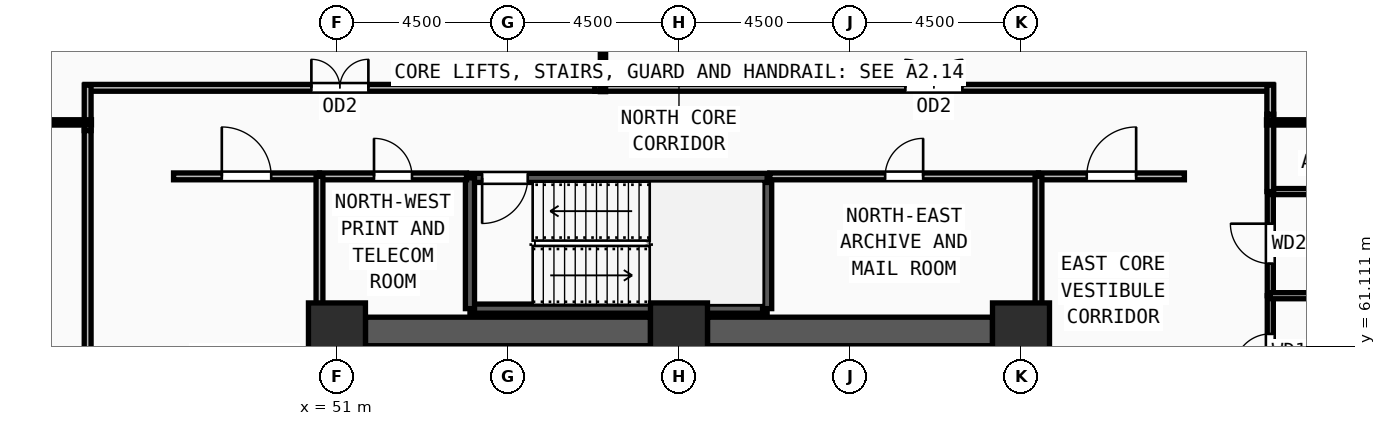
"""IFC4 building model, lengths in metres.
Left out: names, types, materials, properties, quantities, classifications, styles, units other than length and angle.
Written with IfcOpenShell. Run it as: python <this file> out.ifc"""

import sys

from ifc_helpers import new_model, si_unit, direction, frame, frame_2d, origin, origin_2d, place, context, subcontext, project, spatial, rectangle, extrude, source, transform, mapped, element, fill, save


model = new_model("IFC4")
c1 = context("Model", 3, precision=1e-05, world=origin(), true_north=direction((0.0, 1.0)))
c2 = subcontext(c1, "Body", "Model", "MODEL_VIEW")
j1 = project(units=[si_unit("LENGTHUNIT", "METRE"), si_unit("PLANEANGLEUNIT", "RADIAN")], contexts=[c1])
p1 = place(None, origin())
s1 = spatial("IfcSite", under=j1, at=p1, CompositionType="ELEMENT")
p2 = place(p1, origin())
s2 = spatial("IfcBuilding", under=s1, at=p2, CompositionType="ELEMENT")
p3 = place(p2, frame((0.0, 0.0, 113.25)))
s3 = spatial("IfcBuildingStorey", under=s2, at=p3, CompositionType="ELEMENT", Elevation=113.25)
m1 = source(origin(), c2, "Body", "SweptSolid", [
    extrude(rectangle(XDim=1.5, YDim=1.5, at=origin_2d()), origin(), (0.0, 0.0, 1.0), 3.75),
])
for number, where, z_axis, x_axis in (
    (1, (69.0, 61.5, 0.0), (0.0, 0.0, 1.0), (1.0, 0.0, 0.0)),
    (2, (60.0, 61.5, 0.0), (0.0, 0.0, 1.0), (1.0, 0.0, 0.0)),
    (3, (51.0, 61.5, 0.0), (0.0, 0.0, 1.0), (1.0, 0.0, 0.0)),
):
    element("IfcColumn", number, at=place(p3, frame(where, z_axis=z_axis, x_axis=x_axis)), inside=s3, PredefinedType="COLUMN", context=c2, shape_type="MappedRepresentation", body=[
        mapped(m1, transform((0.0, 0.0, 0.0), x_axis=(1.0, 0.0, 0.0), y_axis=(0.0, 1.0, 0.0), z_axis=(0.0, 0.0, 1.0), scale=1.0)),
    ])
for number, where, z_axis, x_axis in (
    (4, (51.75, 61.5, 0.0), (0.0, 0.0, 1.0), (1.0, 0.0, 0.0)),
    (5, (60.75, 61.5, 0.0), (0.0, 0.0, 1.0), (1.0, 0.0, 0.0)),
):
    element("IfcWall", number, at=place(p3, frame(where, z_axis=z_axis, x_axis=x_axis)), inside=s3, PredefinedType="SHEAR", context=c2, shape_type="SweptSolid", body=[
        extrude(rectangle(XDim=7.5, YDim=0.75, at=frame_2d((3.75, 0.0))), origin(), (0.0, 0.0, 1.0), 3.57),
    ])
p4 = place(p3, frame((54.5, 62.1, 0.0), z_axis=(0.0, 0.0, 1.0), x_axis=(1.0, 0.0, 0.0)))
e6 = element("IfcWall", 6, at=p4, inside=s3, PredefinedType="SOLIDWALL", context=c2, shape_type="SweptSolid", body=[
    extrude(rectangle(XDim=7.82, YDim=0.24, at=frame_2d((3.91, 0.0))), origin(), (0.0, 0.0, 1.0), 3.57),
])
p5 = place(p3, frame((62.32, 62.1, 0.0), z_axis=(0.0, 0.0, 1.0), x_axis=(0.0, 1.0, 0.0)))
e7 = element("IfcWall", 7, at=p5, inside=s3, PredefinedType="SOLIDWALL", context=c2, shape_type="SweptSolid", body=[
    extrude(rectangle(XDim=3.44, YDim=0.24, at=frame_2d((1.72, 0.0))), origin(), (0.0, 0.0, 1.0), 3.57),
])
p6 = place(p3, frame((62.32, 65.54, 0.0), z_axis=(0.0, 0.0, 1.0), x_axis=(-1.0, 0.0, 0.0)))
e8 = element("IfcWall", 8, at=p6, inside=s3, PredefinedType="SOLIDWALL", context=c2, shape_type="SweptSolid", body=[
    extrude(rectangle(XDim=7.82, YDim=0.24, at=frame_2d((3.91, 0.0))), origin(), (0.0, 0.0, 1.0), 3.57),
])
m2 = source(origin(), c2, "Body", "SweptSolid", [
    extrude(rectangle(XDim=1.2, YDim=2.2, at=frame_2d((0.6, 1.1))), frame((0.0, 0.13, 0.0), z_axis=(0.0, -1.0, 0.0), x_axis=(1.0, 0.0, 0.0)), (0.0, 0.0, 1.0), 0.26),
])
p7 = place(p6, frame((6.3, 0.0, 0.0)))
e9 = element("IfcOpeningElement", 9, at=p7, cuts=e8, PredefinedType="OPENING", context=c2, shape_type="MappedRepresentation", body=[
    mapped(m2, transform((0.0, 0.0, 0.0), x_axis=(1.0, 0.0, 0.0), y_axis=(0.0, 1.0, 0.0), z_axis=(0.0, 0.0, 1.0), scale=1.0)),
])
p8 = place(p3, frame((54.5, 65.54, 0.0), z_axis=(0.0, 0.0, 1.0), x_axis=(0.0, -1.0, 0.0)))
e10 = element("IfcWall", 10, at=p8, inside=s3, PredefinedType="SOLIDWALL", context=c2, shape_type="SweptSolid", body=[
    extrude(rectangle(XDim=3.44, YDim=0.24, at=frame_2d((1.72, 0.0))), origin(), (0.0, 0.0, 1.0), 3.57),
])
p9 = place(p3, frame((75.56, 59.48, 0.0), z_axis=(0.0, 0.0, 1.0), x_axis=(0.0, 1.0, 0.0)))
e11 = element("IfcWall", 11, at=p9, inside=s3, PredefinedType="PARTITIONING", context=c2, shape_type="SweptSolid", body=[
    extrude(rectangle(XDim=2.96, YDim=0.16, at=frame_2d((1.48, 0.0))), origin(), (0.0, 0.0, 1.0), 3.57),
])
m3 = source(origin(), c2, "Body", "SweptSolid", [
    extrude(rectangle(XDim=0.95, YDim=2.15, at=frame_2d((0.475, 1.075))), frame((0.0, 0.09, 0.0), z_axis=(0.0, -1.0, 0.0), x_axis=(1.0, 0.0, 0.0)), (0.0, 0.0, 1.0), 0.18),
])
p10 = place(p9, frame((1.005, 0.0, 0.0)))
e12 = element("IfcOpeningElement", 12, at=p10, cuts=e11, PredefinedType="OPENING", context=c2, shape_type="MappedRepresentation", body=[
    mapped(m3, transform((0.0, 0.0, 0.0), x_axis=(1.0, 0.0, 0.0), y_axis=(0.0, 1.0, 0.0), z_axis=(0.0, 0.0, 1.0), scale=1.0)),
])
p11 = place(p3, frame((75.56, 62.44, 0.0), z_axis=(0.0, 0.0, 1.0), x_axis=(0.0, 1.0, 0.0)))
e13 = element("IfcWall", 13, at=p11, inside=s3, PredefinedType="PARTITIONING", context=c2, shape_type="SweptSolid", body=[
    extrude(rectangle(XDim=2.74, YDim=0.16, at=frame_2d((1.37, 0.0))), origin(), (0.0, 0.0, 1.0), 3.57),
])
m4 = source(origin(), c2, "Body", "SweptSolid", [
    extrude(rectangle(XDim=1.05, YDim=2.15, at=frame_2d((0.525, 1.075))), frame((0.0, 0.09, 0.0), z_axis=(0.0, -1.0, 0.0), x_axis=(1.0, 0.0, 0.0)), (0.0, 0.0, 1.0), 0.18),
])
p12 = place(p11, frame((0.845, 0.0, 0.0)))
e14 = element("IfcOpeningElement", 14, at=p12, cuts=e13, PredefinedType="OPENING", context=c2, shape_type="MappedRepresentation", body=[
    mapped(m4, transform((0.0, 0.0, 0.0), x_axis=(1.0, 0.0, 0.0), y_axis=(0.0, 1.0, 0.0), z_axis=(0.0, 0.0, 1.0), scale=1.0)),
])
p13 = place(p3, frame((50.54, 65.58, 0.0), z_axis=(0.0, 0.0, 1.0), x_axis=(1.0, 0.0, 0.0)))
e15 = element("IfcWall", 15, at=p13, inside=s3, PredefinedType="PARTITIONING", context=c2, shape_type="SweptSolid", body=[
    extrude(rectangle(XDim=3.87, YDim=0.18, at=frame_2d((1.935, 0.0))), origin(), (0.0, 0.0, 1.0), 3.57),
])
m5 = source(origin(), c2, "Body", "SweptSolid", [
    extrude(rectangle(XDim=1.0, YDim=2.2, at=frame_2d((0.5, 1.1))), frame((0.0, 0.1, 0.0), z_axis=(0.0, -1.0, 0.0), x_axis=(1.0, 0.0, 0.0)), (0.0, 0.0, 1.0), 0.2),
])
p14 = place(p13, frame((1.435, 0.0, 0.0)))
e16 = element("IfcOpeningElement", 16, at=p14, cuts=e15, PredefinedType="OPENING", context=c2, shape_type="MappedRepresentation", body=[
    mapped(m5, transform((0.0, 0.0, 0.0), x_axis=(1.0, 0.0, 0.0), y_axis=(0.0, 1.0, 0.0), z_axis=(0.0, 0.0, 1.0), scale=1.0)),
])
p15 = place(p3, frame((62.39, 65.58, 0.0), z_axis=(0.0, 0.0, 1.0), x_axis=(1.0, 0.0, 0.0)))
e17 = element("IfcWall", 17, at=p15, inside=s3, PredefinedType="PARTITIONING", context=c2, shape_type="SweptSolid", body=[
    extrude(rectangle(XDim=7.07, YDim=0.18, at=frame_2d((3.535, 0.0))), origin(), (0.0, 0.0, 1.0), 3.57),
])
p16 = place(p15, frame((3.035, 0.0, 0.0)))
e18 = element("IfcOpeningElement", 18, at=p16, cuts=e17, PredefinedType="OPENING", context=c2, shape_type="MappedRepresentation", body=[
    mapped(m5, transform((0.0, 0.0, 0.0), x_axis=(1.0, 0.0, 0.0), y_axis=(0.0, 1.0, 0.0), z_axis=(0.0, 0.0, 1.0), scale=1.0)),
])
p17 = place(p3, frame((46.7, 65.58, 0.0), z_axis=(0.0, 0.0, 1.0), x_axis=(1.0, 0.0, 0.0)))
e19 = element("IfcWall", 19, at=p17, inside=s3, PredefinedType="PARTITIONING", context=c2, shape_type="SweptSolid", body=[
    extrude(rectangle(XDim=3.84, YDim=0.18, at=frame_2d((1.92, 0.0))), origin(), (0.0, 0.0, 1.0), 3.57),
])
m6 = source(origin(), c2, "Body", "SweptSolid", [
    extrude(rectangle(XDim=1.3, YDim=2.2, at=frame_2d((0.65, 1.1))), frame((0.0, 0.1, 0.0), z_axis=(0.0, -1.0, 0.0), x_axis=(1.0, 0.0, 0.0)), (0.0, 0.0, 1.0), 0.2),
])
p18 = place(p17, frame((1.27, 0.0, 0.0)))
e20 = element("IfcOpeningElement", 20, at=p18, cuts=e19, PredefinedType="OPENING", context=c2, shape_type="MappedRepresentation", body=[
    mapped(m6, transform((0.0, 0.0, 0.0), x_axis=(1.0, 0.0, 0.0), y_axis=(0.0, 1.0, 0.0), z_axis=(0.0, 0.0, 1.0), scale=1.0)),
])
p19 = place(p3, frame((69.46, 65.58, 0.0), z_axis=(0.0, 0.0, 1.0), x_axis=(1.0, 0.0, 0.0)))
e21 = element("IfcWall", 21, at=p19, inside=s3, PredefinedType="PARTITIONING", context=c2, shape_type="SweptSolid", body=[
    extrude(rectangle(XDim=3.84, YDim=0.18, at=frame_2d((1.92, 0.0))), origin(), (0.0, 0.0, 1.0), 3.57),
])
p20 = place(p19, frame((1.27, 0.0, 0.0)))
e22 = element("IfcOpeningElement", 22, at=p20, cuts=e21, PredefinedType="OPENING", context=c2, shape_type="MappedRepresentation", body=[
    mapped(m6, transform((0.0, 0.0, 0.0), x_axis=(1.0, 0.0, 0.0), y_axis=(0.0, 1.0, 0.0), z_axis=(0.0, 0.0, 1.0), scale=1.0)),
])
p21 = place(p3, frame((57.785, 67.91, 0.0), z_axis=(0.0, 0.0, 1.0), x_axis=(1.0, 0.0, 0.0)))
e23 = element("IfcWall", 23, at=p21, inside=s3, PredefinedType="PARTITIONING", context=c2, shape_type="SweptSolid", body=[
    extrude(rectangle(XDim=17.845, YDim=0.18, at=frame_2d((8.922, 0.0))), origin(), (0.0, 0.0, 1.0), 3.57),
])
m7 = source(origin(), c2, "Body", "SweptSolid", [
    extrude(rectangle(XDim=1.5, YDim=2.2, at=frame_2d((0.75, 1.1))), frame((0.0, 0.1, 0.0), z_axis=(0.0, -1.0, 0.0), x_axis=(1.0, 0.0, 0.0)), (0.0, 0.0, 1.0), 0.2),
])
p22 = place(p21, frame((8.172, 0.0, 0.0)))
e24 = element("IfcOpeningElement", 24, at=p22, cuts=e23, PredefinedType="OPENING", context=c2, shape_type="MappedRepresentation", body=[
    mapped(m7, transform((0.0, 0.0, 0.0), x_axis=(1.0, 0.0, 0.0), y_axis=(0.0, 1.0, 0.0), z_axis=(0.0, 0.0, 1.0), scale=1.0)),
])
p23 = place(p3, frame((44.37, 67.91, 0.0), z_axis=(0.0, 0.0, 1.0), x_axis=(1.0, 0.0, 0.0)))
e25 = element("IfcWall", 25, at=p23, inside=s3, PredefinedType="PARTITIONING", context=c2, shape_type="SweptSolid", body=[
    extrude(rectangle(XDim=13.415, YDim=0.18, at=frame_2d((6.708, 0.0))), origin(), (0.0, 0.0, 1.0), 3.57),
])
p24 = place(p23, frame((5.957, 0.0, 0.0)))
e26 = element("IfcOpeningElement", 26, at=p24, cuts=e25, PredefinedType="OPENING", context=c2, shape_type="MappedRepresentation", body=[
    mapped(m7, transform((0.0, 0.0, 0.0), x_axis=(1.0, 0.0, 0.0), y_axis=(0.0, 1.0, 0.0), z_axis=(0.0, 0.0, 1.0), scale=1.0)),
])
for number, where, z_axis, x_axis in (
    (27, (75.56, 62.44, 0.0), (0.0, 0.0, 1.0), (1.0, 0.0, 0.0)),
    (28, (75.56, 65.18, 0.0), (0.0, 0.0, 1.0), (1.0, 0.0, 0.0)),
):
    element("IfcWall", number, at=place(p3, frame(where, z_axis=z_axis, x_axis=x_axis)), inside=s3, PredefinedType="PARTITIONING", context=c2, shape_type="SweptSolid", body=[
        extrude(rectangle(XDim=4.46, YDim=0.16, at=frame_2d((2.23, 0.0))), origin(), (0.0, 0.0, 1.0), 3.57),
    ])
for number, where, z_axis, x_axis in (
    (29, (50.54, 61.95, 0.0), (0.0, 0.0, 1.0), (0.0, 1.0, 0.0)),
    (30, (69.46, 61.95, 0.0), (0.0, 0.0, 1.0), (0.0, 1.0, 0.0)),
):
    element("IfcWall", number, at=place(p3, frame(where, z_axis=z_axis, x_axis=x_axis)), inside=s3, PredefinedType="PARTITIONING", context=c2, shape_type="SweptSolid", body=[
        extrude(rectangle(XDim=3.63, YDim=0.18, at=frame_2d((1.815, 0.0))), origin(), (0.0, 0.0, 1.0), 3.57),
    ])
p25 = place(p3, frame((75.56, 67.215, 0.0), z_axis=(0.0, 0.0, 1.0), x_axis=(0.0, -1.0, 0.0)))
e31 = element("IfcWall", 31, at=p25, inside=s3, PredefinedType="PARTITIONING", context=c2, shape_type="SweptSolid", body=[
    extrude(rectangle(XDim=2.035, YDim=0.18, at=frame_2d((1.018, 0.0))), origin(), (0.0, 0.0, 1.0), 3.57),
])
p26 = place(p3, frame((75.56, 67.98, 0.0), z_axis=(0.0, 0.0, 1.0), x_axis=(0.0, -1.0, 0.0)))
e32 = element("IfcWall", 32, at=p26, inside=s3, PredefinedType="PARTITIONING", context=c2, shape_type="SweptSolid", body=[
    extrude(rectangle(XDim=0.765, YDim=0.18, at=frame_2d((0.382, 0.0))), origin(), (0.0, 0.0, 1.0), 3.57),
])
p27 = place(p3, frame((44.44, 66.785, 0.0), z_axis=(0.0, 0.0, 1.0), x_axis=(0.0, 1.0, 0.0)))
e33 = element("IfcWall", 33, at=p27, inside=s3, PredefinedType="PARTITIONING", context=c2, shape_type="SweptSolid", body=[
    extrude(rectangle(XDim=1.195, YDim=0.18, at=frame_2d((0.598, 0.0))), origin(), (0.0, 0.0, 1.0), 3.57),
])
p28 = place(p3, frame((44.44, 56.19, 0.0), z_axis=(0.0, 0.0, 1.0), x_axis=(0.0, 1.0, 0.0)))
e34 = element("IfcWall", 34, at=p28, inside=s3, PredefinedType="PARTITIONING", context=c2, shape_type="SweptSolid", body=[
    extrude(rectangle(XDim=10.595, YDim=0.18, at=frame_2d((5.297, 0.0))), origin(), (0.0, 0.0, 1.0), 3.57),
])
p29 = place(p3, frame((44.54, 67.0, 0.0), z_axis=(0.0, 0.0, 1.0), x_axis=(-1.0, 0.0, 0.0)))
e35 = element("IfcWall", 35, at=p29, inside=s3, PredefinedType="PARTITIONING", context=c2, shape_type="SweptSolid", body=[
    extrude(rectangle(XDim=21.17, YDim=0.14, at=frame_2d((10.585, 0.0))), origin(), (0.0, 0.0, 1.0), 2.755),
])
p30 = place(p3, frame((75.46, 67.0, 0.0), z_axis=(0.0, 0.0, 1.0), x_axis=(1.0, 0.0, 0.0)))
e36 = element("IfcWall", 36, at=p30, inside=s3, PredefinedType="PARTITIONING", context=c2, shape_type="SweptSolid", body=[
    extrude(rectangle(XDim=21.191, YDim=0.14, at=frame_2d((10.595, 0.0))), origin(), (0.0, 0.0, 1.0), 2.755),
])
p31 = place(p3, frame((58.0, 67.81, 0.0), z_axis=(0.0, 0.0, 1.0), x_axis=(0.0, 1.0, 0.0)))
e37 = element("IfcWall", 37, at=p31, inside=s3, PredefinedType="PARTITIONING", context=c2, shape_type="SweptSolid", body=[
    extrude(rectangle(XDim=13.25, YDim=0.14, at=frame_2d((6.625, 0.0))), origin(), (0.0, 0.0, 1.0), 3.57),
])
m8 = source(origin(), c2, "Body", "SweptSolid", [
    extrude(rectangle(XDim=1.2, YDim=2.2, at=frame_2d((0.6, 1.1))), frame((0.0, 0.025, 0.0), z_axis=(0.0, -1.0, 0.0), x_axis=(1.0, 0.0, 0.0)), (0.0, 0.0, 1.0), 0.05),
])
p32 = place(p7, origin())
e38 = element("IfcDoor", 38, at=p32, inside=s3, OperationType="SINGLE_SWING_RIGHT", PredefinedType="DOOR", context=c2, shape_type="MappedRepresentation", body=[
    mapped(m8, transform((0.0, 0.0, 0.0), x_axis=(1.0, 0.0, 0.0), y_axis=(0.0, 1.0, 0.0), z_axis=(0.0, 0.0, 1.0), scale=1.0)),
])
fill(e9, e38)
m9 = source(origin(), c2, "Body", "SweptSolid", [
    extrude(rectangle(XDim=0.95, YDim=2.15, at=frame_2d((0.475, 1.075))), frame((0.0, 0.025, 0.0), z_axis=(0.0, -1.0, 0.0), x_axis=(1.0, 0.0, 0.0)), (0.0, 0.0, 1.0), 0.05),
])
p33 = place(p10, origin())
e39 = element("IfcDoor", 39, at=p33, inside=s3, OperationType="SINGLE_SWING_LEFT", PredefinedType="DOOR", context=c2, shape_type="MappedRepresentation", body=[
    mapped(m9, transform((0.0, 0.0, 0.0), x_axis=(1.0, 0.0, 0.0), y_axis=(0.0, 1.0, 0.0), z_axis=(0.0, 0.0, 1.0), scale=1.0)),
])
fill(e12, e39)
m10 = source(origin(), c2, "Body", "SweptSolid", [
    extrude(rectangle(XDim=1.05, YDim=2.15, at=frame_2d((0.525, 1.075))), frame((0.0, 0.025, 0.0), z_axis=(0.0, -1.0, 0.0), x_axis=(1.0, 0.0, 0.0)), (0.0, 0.0, 1.0), 0.05),
])
p34 = place(p12, origin())
e40 = element("IfcDoor", 40, at=p34, inside=s3, OperationType="SINGLE_SWING_RIGHT", PredefinedType="DOOR", context=c2, shape_type="MappedRepresentation", body=[
    mapped(m10, transform((0.0, 0.0, 0.0), x_axis=(1.0, 0.0, 0.0), y_axis=(0.0, 1.0, 0.0), z_axis=(0.0, 0.0, 1.0), scale=1.0)),
])
fill(e14, e40)
m11 = source(origin(), c2, "Body", "SweptSolid", [
    extrude(rectangle(XDim=1.0, YDim=2.2, at=frame_2d((0.5, 1.1))), frame((0.0, 0.025, 0.0), z_axis=(0.0, -1.0, 0.0), x_axis=(1.0, 0.0, 0.0)), (0.0, 0.0, 1.0), 0.05),
])
p35 = place(p14, origin())
e41 = element("IfcDoor", 41, at=p35, inside=s3, OperationType="SINGLE_SWING_LEFT", PredefinedType="DOOR", context=c2, shape_type="MappedRepresentation", body=[
    mapped(m11, transform((0.0, 0.0, 0.0), x_axis=(1.0, 0.0, 0.0), y_axis=(0.0, 1.0, 0.0), z_axis=(0.0, 0.0, 1.0), scale=1.0)),
])
fill(e16, e41)
p36 = place(p16, origin())
e42 = element("IfcDoor", 42, at=p36, inside=s3, OperationType="SINGLE_SWING_RIGHT", PredefinedType="DOOR", context=c2, shape_type="MappedRepresentation", body=[
    mapped(m11, transform((0.0, 0.0, 0.0), x_axis=(1.0, 0.0, 0.0), y_axis=(0.0, 1.0, 0.0), z_axis=(0.0, 0.0, 1.0), scale=1.0)),
])
fill(e18, e42)
m12 = source(origin(), c2, "Body", "SweptSolid", [
    extrude(rectangle(XDim=1.3, YDim=2.2, at=frame_2d((0.65, 1.1))), frame((0.0, 0.025, 0.0), z_axis=(0.0, -1.0, 0.0), x_axis=(1.0, 0.0, 0.0)), (0.0, 0.0, 1.0), 0.05),
])
p37 = place(p18, origin())
e43 = element("IfcDoor", 43, at=p37, inside=s3, OperationType="SINGLE_SWING_LEFT", PredefinedType="DOOR", context=c2, shape_type="MappedRepresentation", body=[
    mapped(m12, transform((0.0, 0.0, 0.0), x_axis=(1.0, 0.0, 0.0), y_axis=(0.0, 1.0, 0.0), z_axis=(0.0, 0.0, 1.0), scale=1.0)),
])
fill(e20, e43)
p38 = place(p20, origin())
e44 = element("IfcDoor", 44, at=p38, inside=s3, OperationType="SINGLE_SWING_RIGHT", PredefinedType="DOOR", context=c2, shape_type="MappedRepresentation", body=[
    mapped(m12, transform((0.0, 0.0, 0.0), x_axis=(1.0, 0.0, 0.0), y_axis=(0.0, 1.0, 0.0), z_axis=(0.0, 0.0, 1.0), scale=1.0)),
])
fill(e22, e44)
m13 = source(origin(), c2, "Body", "SweptSolid", [
    extrude(rectangle(XDim=1.5, YDim=2.2, at=frame_2d((0.75, 1.1))), frame((0.0, 0.025, 0.0), z_axis=(0.0, -1.0, 0.0), x_axis=(1.0, 0.0, 0.0)), (0.0, 0.0, 1.0), 0.05),
])
p39 = place(p22, origin())
e45 = element("IfcDoor", 45, at=p39, inside=s3, OperationType="DOUBLE_DOOR_SINGLE_SWING", PredefinedType="DOOR", context=c2, shape_type="MappedRepresentation", body=[
    mapped(m13, transform((0.0, 0.0, 0.0), x_axis=(1.0, 0.0, 0.0), y_axis=(0.0, 1.0, 0.0), z_axis=(0.0, 0.0, 1.0), scale=1.0)),
])
fill(e24, e45)
p40 = place(p24, origin())
e46 = element("IfcDoor", 46, at=p40, inside=s3, OperationType="DOUBLE_DOOR_SINGLE_SWING", PredefinedType="DOOR", context=c2, shape_type="MappedRepresentation", body=[
    mapped(m13, transform((0.0, 0.0, 0.0), x_axis=(1.0, 0.0, 0.0), y_axis=(0.0, 1.0, 0.0), z_axis=(0.0, 0.0, 1.0), scale=1.0)),
])
fill(e26, e46)
save(model, sys.argv[1])
